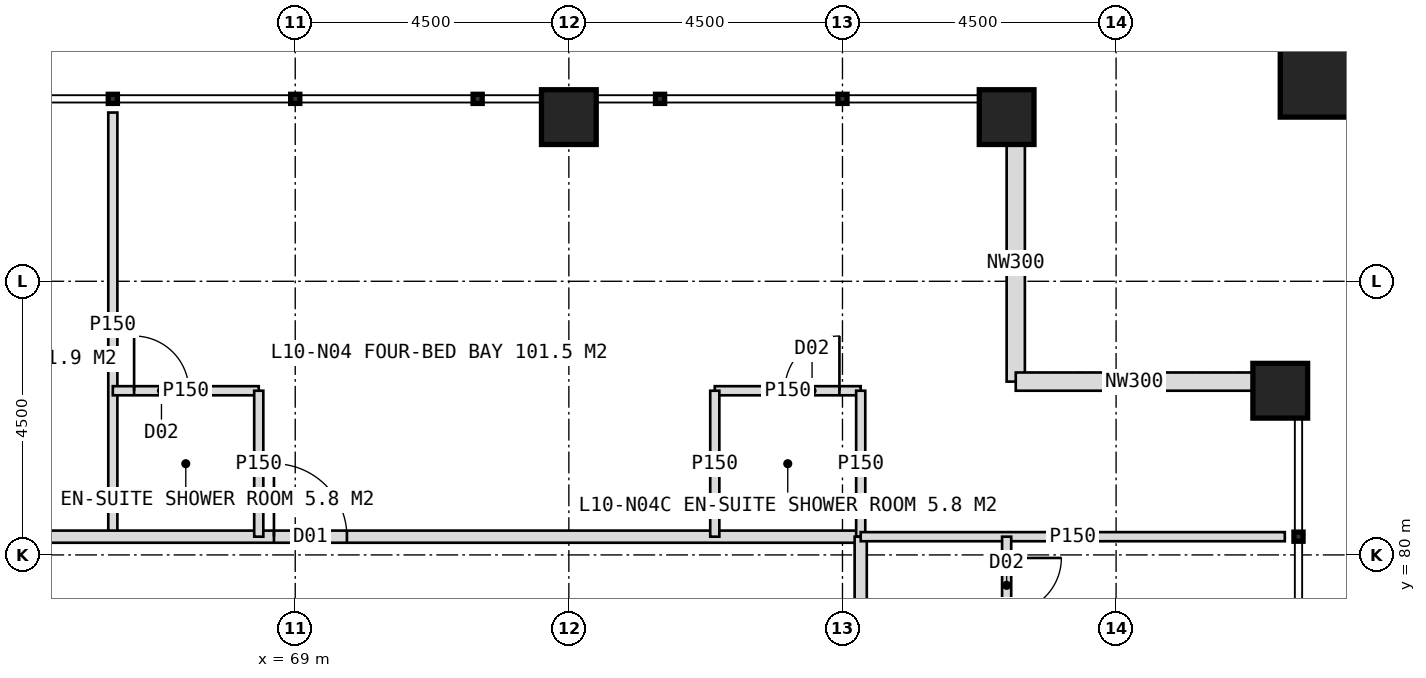
"""IFC4 building model, lengths in metres.
Left out: names, types, materials, properties, quantities, classifications, styles, units other than length and angle.
Written with IfcOpenShell. Run it as: python <this file> out.ifc"""

import sys

from ifc_helpers import new_model, si_unit, direction, frame, frame_2d, origin, origin_2d, place, context, subcontext, project, spatial, rectangle, hollow_rectangle, extrude, element, fill, save


model = new_model("IFC4")
c1 = context("Model", 3, precision=1e-05, world=origin(), true_north=direction((0.0, 1.0)))
c2 = subcontext(c1, "Body", "Model", "MODEL_VIEW")
j1 = project(units=[si_unit("LENGTHUNIT", "METRE"), si_unit("PLANEANGLEUNIT", "RADIAN")], contexts=[c1])
p1 = place(None, origin())
s1 = spatial("IfcSite", under=j1, at=p1, CompositionType="ELEMENT")
p2 = place(p1, origin())
s2 = spatial("IfcBuilding", under=s1, at=p2, CompositionType="ELEMENT")
p3 = place(p2, frame((0.0, 0.0, 47.0)))
s3 = spatial("IfcBuildingStorey", under=s2, at=p3, CompositionType="ELEMENT", Elevation=47.0)
for number, where, z_axis, x_axis in (
    (1, (73.5, 87.2, 0.0), (0.0, 0.0, 1.0), (1.0, 0.0, 0.0)),
    (2, (80.7, 87.2, 0.0), (0.0, 0.0, 1.0), (1.0, 0.0, 0.0)),
    (3, (85.2, 82.7, 0.0), (0.0, 0.0, 1.0), (1.0, 0.0, 0.0)),
):
    element("IfcColumn", number, at=place(p3, frame(where, z_axis=z_axis, x_axis=x_axis)), inside=s3, PredefinedType="COLUMN", context=c2, shape_type="SweptSolid", body=[
        extrude(hollow_rectangle(XDim=0.9, YDim=0.9, WallThickness=0.08, at=origin_2d()), origin(), (0.0, 0.0, 1.0), 4.0),
    ])
p4 = place(p3, frame((86.1, 88.1, 0.0), z_axis=(0.0, 0.0, 1.0), x_axis=(1.0, 0.0, 0.0)))
e4 = element("IfcColumn", 4, at=p4, inside=s3, PredefinedType="COLUMN", context=c2, shape_type="SweptSolid", body=[
    extrude(hollow_rectangle(XDim=1.8, YDim=1.8, WallThickness=0.1, at=origin_2d()), origin(), (0.0, 0.0, 1.0), 4.0),
])
for number, where, z_axis, x_axis in (
    (5, (80.85, 86.75, 0.0), (0.0, 0.0, 1.0), (0.0, -1.0, 0.0)),
    (6, (80.85, 82.85, 0.0), (0.0, 0.0, 1.0), (1.0, 0.0, 0.0)),
):
    element("IfcWall", number, at=place(p3, frame(where, z_axis=z_axis, x_axis=x_axis)), inside=s3, PredefinedType="ELEMENTEDWALL", context=c2, shape_type="SweptSolid", body=[
        extrude(rectangle(XDim=3.9, YDim=0.3, at=frame_2d((1.95, 0.0))), origin(), (0.0, 0.0, 1.0), 2.95),
    ])
p5 = place(p3, frame((66.0, 80.3, 0.0), z_axis=(0.0, 0.0, 1.0), x_axis=(0.0, 1.0, 0.0)))
e7 = element("IfcWall", 7, at=p5, inside=s3, PredefinedType="PARTITIONING", context=c2, shape_type="SweptSolid", body=[
    extrude(rectangle(XDim=6.975, YDim=0.15, at=frame_2d((3.487, 0.0))), origin(), (0.0, 0.0, 1.0), 3.75),
])
p6 = place(p3, frame((41.7, 80.3, 0.0), z_axis=(0.0, 0.0, 1.0), x_axis=(1.0, 0.0, 0.0)))
e8 = element("IfcWall", 8, at=p6, inside=s3, PredefinedType="PARTITIONING", context=c2, shape_type="SweptSolid", body=[
    extrude(rectangle(XDim=36.6, YDim=0.2, at=frame_2d((18.3, 0.0))), origin(), (0.0, 0.0, 1.0), 3.75),
])
p7 = place(p6, frame((2.65, 0.0, 0.0)))
e9 = element("IfcOpeningElement", 9, at=p7, cuts=e8, PredefinedType="OPENING", context=c2, shape_type="SweptSolid", body=[
    extrude(rectangle(XDim=1.2, YDim=2.2, at=frame_2d((0.6, 1.1))), frame((0.0, 0.11, 0.0), z_axis=(0.0, -1.0, 0.0), x_axis=(1.0, 0.0, 0.0)), (0.0, 0.0, 1.0), 0.22),
])
p8 = place(p6, frame((11.95, 0.0, 0.0)))
e10 = element("IfcOpeningElement", 10, at=p8, cuts=e8, PredefinedType="OPENING", context=c2, shape_type="SweptSolid", body=[
    extrude(rectangle(XDim=1.2, YDim=2.2, at=frame_2d((0.6, 1.1))), frame((0.0, 0.11, 0.0), z_axis=(0.0, -1.0, 0.0), x_axis=(1.0, 0.0, 0.0)), (0.0, 0.0, 1.0), 0.22),
])
p9 = place(p6, frame((20.8, 0.0, 0.0)))
e11 = element("IfcOpeningElement", 11, at=p9, cuts=e8, PredefinedType="OPENING", context=c2, shape_type="SweptSolid", body=[
    extrude(rectangle(XDim=1.0, YDim=2.1, at=frame_2d((0.5, 1.05))), frame((0.0, 0.11, 0.0), z_axis=(0.0, -1.0, 0.0), x_axis=(1.0, 0.0, 0.0)), (0.0, 0.0, 1.0), 0.22),
])
p10 = place(p6, frame((26.95, 0.0, 0.0)))
e12 = element("IfcOpeningElement", 12, at=p10, cuts=e8, PredefinedType="OPENING", context=c2, shape_type="SweptSolid", body=[
    extrude(rectangle(XDim=1.2, YDim=2.2, at=frame_2d((0.6, 1.1))), frame((0.0, 0.11, 0.0), z_axis=(0.0, -1.0, 0.0), x_axis=(1.0, 0.0, 0.0)), (0.0, 0.0, 1.0), 0.22),
])
p11 = place(p3, frame((66.0, 82.7, 0.0), z_axis=(0.0, 0.0, 1.0), x_axis=(1.0, 0.0, 0.0)))
e13 = element("IfcWall", 13, at=p11, inside=s3, PredefinedType="PARTITIONING", context=c2, shape_type="SweptSolid", body=[
    extrude(rectangle(XDim=2.4, YDim=0.15, at=frame_2d((1.2, 0.0))), origin(), (0.0, 0.0, 1.0), 3.75),
])
p12 = place(p11, frame((0.35, 0.0, 0.0)))
e14 = element("IfcOpeningElement", 14, at=p12, cuts=e13, PredefinedType="OPENING", context=c2, shape_type="SweptSolid", body=[
    extrude(rectangle(XDim=0.9, YDim=2.1, at=frame_2d((0.45, 1.05))), frame((0.0, 0.085, 0.0), z_axis=(0.0, -1.0, 0.0), x_axis=(1.0, 0.0, 0.0)), (0.0, 0.0, 1.0), 0.17),
])
p13 = place(p3, frame((68.4, 80.3, 0.0), z_axis=(0.0, 0.0, 1.0), x_axis=(0.0, 1.0, 0.0)))
e15 = element("IfcWall", 15, at=p13, inside=s3, PredefinedType="PARTITIONING", context=c2, shape_type="SweptSolid", body=[
    extrude(rectangle(XDim=2.4, YDim=0.15, at=frame_2d((1.2, 0.0))), origin(), (0.0, 0.0, 1.0), 3.75),
])
p14 = place(p3, frame((75.9, 82.7, 0.0), z_axis=(0.0, 0.0, 1.0), x_axis=(1.0, 0.0, 0.0)))
e16 = element("IfcWall", 16, at=p14, inside=s3, PredefinedType="PARTITIONING", context=c2, shape_type="SweptSolid", body=[
    extrude(rectangle(XDim=2.4, YDim=0.15, at=frame_2d((1.2, 0.0))), origin(), (0.0, 0.0, 1.0), 2.95),
])
p15 = place(p14, frame((1.15, 0.0, 0.0)))
e17 = element("IfcOpeningElement", 17, at=p15, cuts=e16, PredefinedType="OPENING", context=c2, shape_type="SweptSolid", body=[
    extrude(rectangle(XDim=0.9, YDim=2.1, at=frame_2d((0.45, 1.05))), frame((0.0, 0.085, 0.0), z_axis=(0.0, -1.0, 0.0), x_axis=(1.0, 0.0, 0.0)), (0.0, 0.0, 1.0), 0.17),
])
for number, where, z_axis, x_axis in (
    (18, (75.9, 80.3, 0.0), (0.0, 0.0, 1.0), (0.0, 1.0, 0.0)),
    (19, (78.3, 80.3, 0.0), (0.0, 0.0, 1.0), (0.0, 1.0, 0.0)),
):
    element("IfcWall", number, at=place(p3, frame(where, z_axis=z_axis, x_axis=x_axis)), inside=s3, PredefinedType="PARTITIONING", context=c2, shape_type="SweptSolid", body=[
        extrude(rectangle(XDim=2.4, YDim=0.15, at=frame_2d((1.2, 0.0))), origin(), (0.0, 0.0, 1.0), 3.75),
    ])
p16 = place(p3, frame((78.3, 80.3, 0.0), z_axis=(0.0, 0.0, 1.0), x_axis=(0.0, -1.0, 0.0)))
e20 = element("IfcWall", 20, at=p16, inside=s3, PredefinedType="PARTITIONING", context=c2, shape_type="SweptSolid", body=[
    extrude(rectangle(XDim=36.6, YDim=0.2, at=frame_2d((18.3, 0.0))), origin(), (0.0, 0.0, 1.0), 3.75),
])
p17 = place(p16, frame((2.65, 0.0, 0.0)))
e21 = element("IfcOpeningElement", 21, at=p17, cuts=e20, PredefinedType="OPENING", context=c2, shape_type="SweptSolid", body=[
    extrude(rectangle(XDim=1.2, YDim=2.2, at=frame_2d((0.6, 1.1))), frame((0.0, 0.11, 0.0), z_axis=(0.0, -1.0, 0.0), x_axis=(1.0, 0.0, 0.0)), (0.0, 0.0, 1.0), 0.22),
])
p18 = place(p16, frame((11.95, 0.0, 0.0)))
e22 = element("IfcOpeningElement", 22, at=p18, cuts=e20, PredefinedType="OPENING", context=c2, shape_type="SweptSolid", body=[
    extrude(rectangle(XDim=1.2, YDim=2.2, at=frame_2d((0.6, 1.1))), frame((0.0, 0.11, 0.0), z_axis=(0.0, -1.0, 0.0), x_axis=(1.0, 0.0, 0.0)), (0.0, 0.0, 1.0), 0.22),
])
p19 = place(p16, frame((20.95, 0.0, 0.0)))
e23 = element("IfcOpeningElement", 23, at=p19, cuts=e20, PredefinedType="OPENING", context=c2, shape_type="SweptSolid", body=[
    extrude(rectangle(XDim=1.2, YDim=2.2, at=frame_2d((0.6, 1.1))), frame((0.0, 0.11, 0.0), z_axis=(0.0, -1.0, 0.0), x_axis=(1.0, 0.0, 0.0)), (0.0, 0.0, 1.0), 0.22),
])
p20 = place(p16, frame((29.95, 0.0, 0.0)))
e24 = element("IfcOpeningElement", 24, at=p20, cuts=e20, PredefinedType="OPENING", context=c2, shape_type="SweptSolid", body=[
    extrude(rectangle(XDim=1.2, YDim=2.2, at=frame_2d((0.6, 1.1))), frame((0.0, 0.11, 0.0), z_axis=(0.0, -1.0, 0.0), x_axis=(1.0, 0.0, 0.0)), (0.0, 0.0, 1.0), 0.22),
])
p21 = place(p3, frame((78.3, 80.3, 0.0), z_axis=(0.0, 0.0, 1.0), x_axis=(1.0, 0.0, 0.0)))
e25 = element("IfcWall", 25, at=p21, inside=s3, PredefinedType="PARTITIONING", context=c2, shape_type="SweptSolid", body=[
    extrude(rectangle(XDim=6.975, YDim=0.15, at=frame_2d((3.487, 0.0))), origin(), (0.0, 0.0, 1.0), 3.75),
])
p22 = place(p3, frame((80.7, 80.3, 0.0), z_axis=(0.0, 0.0, 1.0), x_axis=(0.0, -1.0, 0.0)))
e26 = element("IfcWall", 26, at=p22, inside=s3, PredefinedType="PARTITIONING", context=c2, shape_type="SweptSolid", body=[
    extrude(rectangle(XDim=2.4, YDim=0.15, at=frame_2d((1.2, 0.0))), origin(), (0.0, 0.0, 1.0), 2.95),
])
p23 = place(p22, frame((0.35, 0.0, 0.0)))
e27 = element("IfcOpeningElement", 27, at=p23, cuts=e26, PredefinedType="OPENING", context=c2, shape_type="SweptSolid", body=[
    extrude(rectangle(XDim=0.9, YDim=2.1, at=frame_2d((0.45, 1.05))), frame((0.0, 0.085, 0.0), z_axis=(0.0, -1.0, 0.0), x_axis=(1.0, 0.0, 0.0)), (0.0, 0.0, 1.0), 0.17),
])
p24 = place(p10, origin())
e28 = element("IfcDoor", 28, at=p24, inside=s3, OperationType="SINGLE_SWING_LEFT", PredefinedType="DOOR", context=c2, shape_type="SweptSolid", body=[
    extrude(rectangle(XDim=1.2, YDim=2.2, at=frame_2d((0.6, 1.1))), frame((0.0, 0.025, 0.0), z_axis=(0.0, -1.0, 0.0), x_axis=(1.0, 0.0, 0.0)), (0.0, 0.0, 1.0), 0.05),
])
fill(e12, e28)
p25 = place(p12, origin())
e29 = element("IfcDoor", 29, at=p25, inside=s3, OperationType="SINGLE_SWING_LEFT", PredefinedType="DOOR", context=c2, shape_type="SweptSolid", body=[
    extrude(rectangle(XDim=0.9, YDim=2.1, at=frame_2d((0.45, 1.05))), frame((0.0, 0.025, 0.0), z_axis=(0.0, -1.0, 0.0), x_axis=(1.0, 0.0, 0.0)), (0.0, 0.0, 1.0), 0.05),
])
fill(e14, e29)
p26 = place(p15, origin())
e30 = element("IfcDoor", 30, at=p26, inside=s3, OperationType="SINGLE_SWING_RIGHT", PredefinedType="DOOR", context=c2, shape_type="SweptSolid", body=[
    extrude(rectangle(XDim=0.9, YDim=2.1, at=frame_2d((0.45, 1.05))), frame((0.0, 0.025, 0.0), z_axis=(0.0, -1.0, 0.0), x_axis=(1.0, 0.0, 0.0)), (0.0, 0.0, 1.0), 0.05),
])
fill(e17, e30)
p27 = place(p23, origin())
e31 = element("IfcDoor", 31, at=p27, inside=s3, OperationType="SINGLE_SWING_LEFT", PredefinedType="DOOR", context=c2, shape_type="SweptSolid", body=[
    extrude(rectangle(XDim=0.9, YDim=2.1, at=frame_2d((0.45, 1.05))), frame((0.0, 0.025, 0.0), z_axis=(0.0, -1.0, 0.0), x_axis=(1.0, 0.0, 0.0)), (0.0, 0.0, 1.0), 0.05),
])
fill(e27, e31)
save(model, sys.argv[1])
